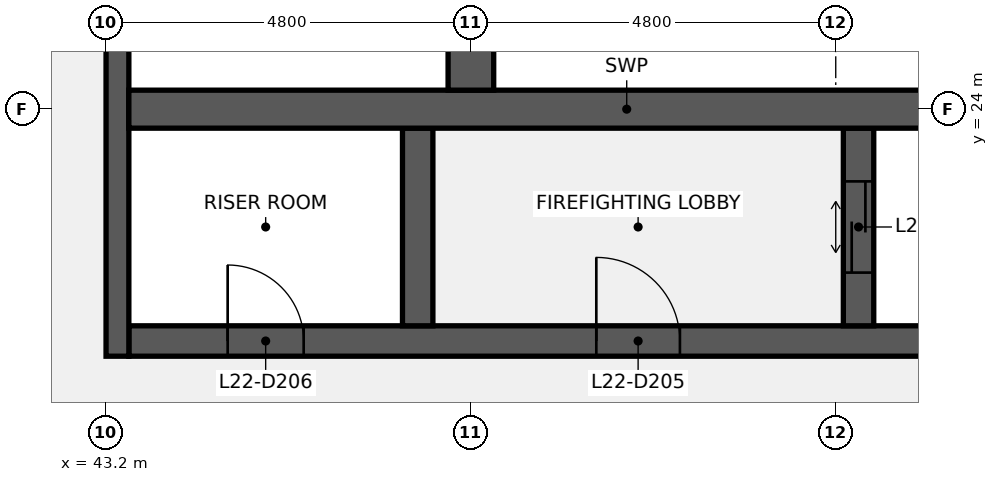
"""IFC4 building model, lengths in metres.
Left out: names, types, materials, properties, quantities, classifications, styles, units other than length and angle.
Written with IfcOpenShell. Run it as: python <this file> out.ifc"""

import sys

from ifc_helpers import new_model, si_unit, direction, frame, frame_2d, origin, place, context, subcontext, project, spatial, rectangle, extrude, element, fill, save


model = new_model("IFC4")
c1 = context("Model", 3, precision=1e-05, world=origin(), true_north=direction((0.0, 1.0)))
c2 = subcontext(c1, "Body", "Model", "MODEL_VIEW")
j1 = project(units=[si_unit("LENGTHUNIT", "METRE"), si_unit("PLANEANGLEUNIT", "RADIAN")], contexts=[c1])
p1 = place(None, origin())
s1 = spatial("IfcSite", under=j1, at=p1, CompositionType="ELEMENT")
p2 = place(p1, origin())
s2 = spatial("IfcBuilding", under=s1, at=p2, CompositionType="ELEMENT")
p3 = place(p2, frame((0.0, 0.0, 108.1)))
s3 = spatial("IfcBuildingStorey", under=s2, at=p3, CompositionType="ELEMENT", Elevation=108.1)
p4 = place(p3, frame((43.5, 20.95, 0.0), z_axis=(0.0, 0.0, 1.0), x_axis=(1.0, 0.0, 0.0)))
e1 = element("IfcWall", 1, at=p4, inside=s3, PredefinedType="SHEAR", context=c2, shape_type="SweptSolid", body=[
    extrude(rectangle(XDim=13.1, YDim=0.4, at=frame_2d((6.55, 0.0))), origin(), (0.0, 0.0, 1.0), 3.84),
])
p5 = place(p4, frame((6.15, 0.0, 0.0)))
e2 = element("IfcOpeningElement", 2, at=p5, cuts=e1, PredefinedType="OPENING", context=c2, shape_type="SweptSolid", body=[
    extrude(rectangle(XDim=1.1, YDim=2.1, at=frame_2d((0.55, 1.05))), frame((0.0, 0.21, 0.0), z_axis=(0.0, -1.0, 0.0), x_axis=(1.0, 0.0, 0.0)), (0.0, 0.0, 1.0), 0.42),
])
p6 = place(p4, frame((1.3, 0.0, 0.0)))
e3 = element("IfcOpeningElement", 3, at=p6, cuts=e1, PredefinedType="OPENING", context=c2, shape_type="SweptSolid", body=[
    extrude(rectangle(XDim=1.0, YDim=2.1, at=frame_2d((0.5, 1.05))), frame((0.0, 0.21, 0.0), z_axis=(0.0, -1.0, 0.0), x_axis=(1.0, 0.0, 0.0)), (0.0, 0.0, 1.0), 0.42),
])
p7 = place(p3, frame((43.35, 20.75, 0.0), z_axis=(0.0, 0.0, 1.0), x_axis=(0.0, 1.0, 0.0)))
e4 = element("IfcWall", 4, at=p7, inside=s3, PredefinedType="SHEAR", context=c2, shape_type="SweptSolid", body=[
    extrude(rectangle(XDim=6.5, YDim=0.3, at=frame_2d((3.25, 0.0))), origin(), (0.0, 0.0, 1.0), 3.84),
])
p8 = place(p3, frame((53.1, 21.15, 0.0), z_axis=(0.0, 0.0, 1.0), x_axis=(0.0, 1.0, 0.0)))
e5 = element("IfcWall", 5, at=p8, inside=s3, PredefinedType="SHEAR", context=c2, shape_type="SweptSolid", body=[
    extrude(rectangle(XDim=2.6, YDim=0.4, at=frame_2d((1.3, 0.0))), origin(), (0.0, 0.0, 1.0), 3.84),
])
p9 = place(p8, frame((0.7, 0.0, 0.0)))
e6 = element("IfcOpeningElement", 6, at=p9, cuts=e5, PredefinedType="OPENING", context=c2, shape_type="SweptSolid", body=[
    extrude(rectangle(XDim=1.2, YDim=2.1, at=frame_2d((0.6, 1.05))), frame((0.0, 0.21, 0.0), z_axis=(0.0, -1.0, 0.0), x_axis=(1.0, 0.0, 0.0)), (0.0, 0.0, 1.0), 0.42),
])
p10 = place(p3, frame((47.3, 21.15, 0.0), z_axis=(0.0, 0.0, 1.0), x_axis=(0.0, 1.0, 0.0)))
e7 = element("IfcWall", 7, at=p10, inside=s3, PredefinedType="SHEAR", context=c2, shape_type="SweptSolid", body=[
    extrude(rectangle(XDim=2.6, YDim=0.4, at=frame_2d((1.3, 0.0))), origin(), (0.0, 0.0, 1.0), 3.84),
])
p11 = place(p3, frame((43.5, 24.0, 0.0), z_axis=(0.0, 0.0, 1.0), x_axis=(1.0, 0.0, 0.0)))
e8 = element("IfcWall", 8, at=p11, inside=s3, PredefinedType="SHEAR", context=c2, shape_type="SweptSolid", body=[
    extrude(rectangle(XDim=13.1, YDim=0.5, at=frame_2d((6.55, 0.0))), origin(), (0.0, 0.0, 1.0), 3.84),
])
p12 = place(p3, frame((48.0, 24.25, 0.0), z_axis=(0.0, 0.0, 1.0), x_axis=(0.0, 1.0, 0.0)))
e9 = element("IfcWall", 9, at=p12, inside=s3, PredefinedType="SHEAR", context=c2, shape_type="SweptSolid", body=[
    extrude(rectangle(XDim=2.6, YDim=0.6, at=frame_2d((1.3, 0.0))), origin(), (0.0, 0.0, 1.0), 3.84),
])
p13 = place(p5, origin())
e10 = element("IfcDoor", 10, at=p13, inside=s3, OperationType="SINGLE_SWING_LEFT", PredefinedType="DOOR", context=c2, shape_type="SweptSolid", body=[
    extrude(rectangle(XDim=1.1, YDim=2.1, at=frame_2d((0.55, 1.05))), frame((0.0, 0.025, 0.0), z_axis=(0.0, -1.0, 0.0), x_axis=(1.0, 0.0, 0.0)), (0.0, 0.0, 1.0), 0.05),
])
fill(e2, e10)
p14 = place(p6, origin())
e11 = element("IfcDoor", 11, at=p14, inside=s3, OperationType="SINGLE_SWING_LEFT", PredefinedType="DOOR", context=c2, shape_type="SweptSolid", body=[
    extrude(rectangle(XDim=1.0, YDim=2.1, at=frame_2d((0.5, 1.05))), frame((0.0, 0.025, 0.0), z_axis=(0.0, -1.0, 0.0), x_axis=(1.0, 0.0, 0.0)), (0.0, 0.0, 1.0), 0.05),
])
fill(e3, e11)
p15 = place(p9, origin())
e12 = element("IfcDoor", 12, at=p15, inside=s3, OperationType="DOUBLE_DOOR_SLIDING", PredefinedType="DOOR", context=c2, shape_type="SweptSolid", body=[
    extrude(rectangle(XDim=1.2, YDim=2.1, at=frame_2d((0.6, 1.05))), frame((0.0, 0.025, 0.0), z_axis=(0.0, -1.0, 0.0), x_axis=(1.0, 0.0, 0.0)), (0.0, 0.0, 1.0), 0.05),
])
fill(e6, e12)
save(model, sys.argv[1])
